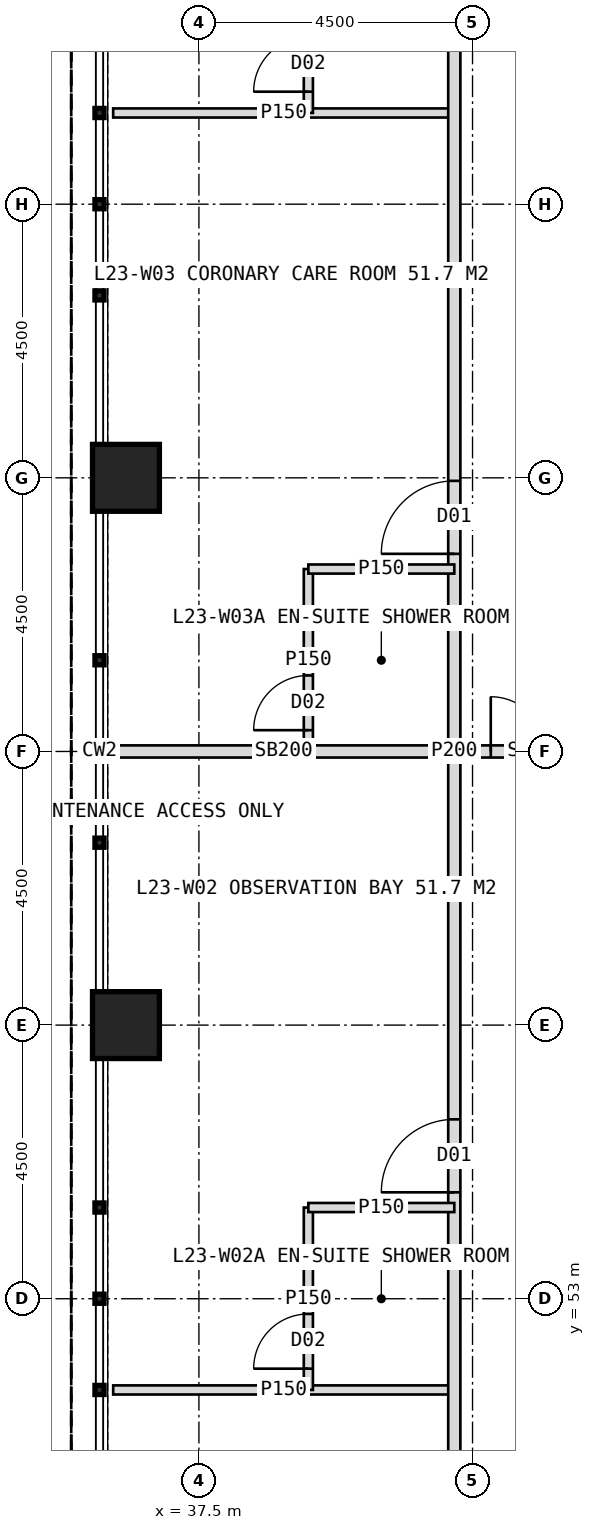
"""IFC4 building model, lengths in metres.
Left out: names, types, materials, properties, quantities, classifications, styles, units other than length and angle.
Written with IfcOpenShell. Run it as: python <this file> out.ifc"""

import sys

from ifc_helpers import new_model, si_unit, direction, frame, frame_2d, origin, origin_2d, place, context, subcontext, project, spatial, rectangle, hollow_rectangle, extrude, element, fill, save


model = new_model("IFC4")
c1 = context("Model", 3, precision=1e-05, world=origin(), true_north=direction((0.0, 1.0)))
c2 = subcontext(c1, "Body", "Model", "MODEL_VIEW")
j1 = project(units=[si_unit("LENGTHUNIT", "METRE"), si_unit("PLANEANGLEUNIT", "RADIAN")], contexts=[c1])
p1 = place(None, origin())
s1 = spatial("IfcSite", under=j1, at=p1, CompositionType="ELEMENT")
p2 = place(p1, origin())
s2 = spatial("IfcBuilding", under=s1, at=p2, CompositionType="ELEMENT")
p3 = place(p2, frame((0.0, 0.0, 100.0)))
s3 = spatial("IfcBuildingStorey", under=s2, at=p3, CompositionType="ELEMENT", Elevation=100.0)
for number, where, z_axis, x_axis in (
    (1, (36.3, 57.5, 0.0), (0.0, 0.0, 1.0), (1.0, 0.0, 0.0)),
    (2, (36.3, 66.5, 0.0), (0.0, 0.0, 1.0), (1.0, 0.0, 0.0)),
):
    element("IfcColumn", number, at=place(p3, frame(where, z_axis=z_axis, x_axis=x_axis)), inside=s3, PredefinedType="COLUMN", context=c2, shape_type="SweptSolid", body=[
        extrude(hollow_rectangle(XDim=1.1, YDim=1.1, WallThickness=0.1, at=origin_2d()), origin(), (0.0, 0.0, 1.0), 4.0),
    ])
p4 = place(p3, frame((41.7, 51.5, 0.0), z_axis=(0.0, 0.0, 1.0), x_axis=(-1.0, 0.0, 0.0)))
e3 = element("IfcWall", 3, at=p4, inside=s3, PredefinedType="PARTITIONING", context=c2, shape_type="SweptSolid", body=[
    extrude(rectangle(XDim=5.61, YDim=0.15, at=frame_2d((2.805, 0.0))), origin(), (0.0, 0.0, 1.0), 3.75),
])
p5 = place(p3, frame((41.7, 62.0, 0.0), z_axis=(0.0, 0.0, 1.0), x_axis=(-1.0, 0.0, 0.0)))
e4 = element("IfcWall", 4, at=p5, inside=s3, PredefinedType="SOLIDWALL", context=c2, shape_type="SweptSolid", body=[
    extrude(rectangle(XDim=5.61, YDim=0.2, at=frame_2d((2.805, 0.0))), origin(), (0.0, 0.0, 1.0), 2.95),
])
p6 = place(p3, frame((41.7, 72.5, 0.0), z_axis=(0.0, 0.0, 1.0), x_axis=(-1.0, 0.0, 0.0)))
e5 = element("IfcWall", 5, at=p6, inside=s3, PredefinedType="PARTITIONING", context=c2, shape_type="SweptSolid", body=[
    extrude(rectangle(XDim=5.61, YDim=0.15, at=frame_2d((2.805, 0.0))), origin(), (0.0, 0.0, 1.0), 3.75),
])
p7 = place(p3, frame((41.7, 43.7, 0.0), z_axis=(0.0, 0.0, 1.0), x_axis=(0.0, 1.0, 0.0)))
e6 = element("IfcWall", 6, at=p7, inside=s3, PredefinedType="PARTITIONING", context=c2, shape_type="SweptSolid", body=[
    extrude(rectangle(XDim=36.6, YDim=0.2, at=frame_2d((18.3, 0.0))), origin(), (0.0, 0.0, 1.0), 3.75),
])
p8 = place(p7, frame((3.25, 0.0, 0.0)))
e7 = element("IfcOpeningElement", 7, at=p8, cuts=e6, PredefinedType="OPENING", context=c2, shape_type="SweptSolid", body=[
    extrude(rectangle(XDim=1.2, YDim=2.2, at=frame_2d((0.6, 1.1))), frame((0.0, 0.11, 0.0), z_axis=(0.0, -1.0, 0.0), x_axis=(1.0, 0.0, 0.0)), (0.0, 0.0, 1.0), 0.22),
])
p9 = place(p7, frame((11.05, 0.0, 0.0)))
e8 = element("IfcOpeningElement", 8, at=p9, cuts=e6, PredefinedType="OPENING", context=c2, shape_type="SweptSolid", body=[
    extrude(rectangle(XDim=1.2, YDim=2.2, at=frame_2d((0.6, 1.1))), frame((0.0, 0.11, 0.0), z_axis=(0.0, -1.0, 0.0), x_axis=(1.0, 0.0, 0.0)), (0.0, 0.0, 1.0), 0.22),
])
p10 = place(p7, frame((21.55, 0.0, 0.0)))
e9 = element("IfcOpeningElement", 9, at=p10, cuts=e6, PredefinedType="OPENING", context=c2, shape_type="SweptSolid", body=[
    extrude(rectangle(XDim=1.2, YDim=2.2, at=frame_2d((0.6, 1.1))), frame((0.0, 0.11, 0.0), z_axis=(0.0, -1.0, 0.0), x_axis=(1.0, 0.0, 0.0)), (0.0, 0.0, 1.0), 0.22),
])
p11 = place(p7, frame((32.05, 0.0, 0.0)))
e10 = element("IfcOpeningElement", 10, at=p11, cuts=e6, PredefinedType="OPENING", context=c2, shape_type="SweptSolid", body=[
    extrude(rectangle(XDim=1.2, YDim=2.2, at=frame_2d((0.6, 1.1))), frame((0.0, 0.11, 0.0), z_axis=(0.0, -1.0, 0.0), x_axis=(1.0, 0.0, 0.0)), (0.0, 0.0, 1.0), 0.22),
])
p12 = place(p3, frame((39.3, 51.5, 0.0), z_axis=(0.0, 0.0, 1.0), x_axis=(0.0, 1.0, 0.0)))
e11 = element("IfcWall", 11, at=p12, inside=s3, PredefinedType="PARTITIONING", context=c2, shape_type="SweptSolid", body=[
    extrude(rectangle(XDim=3.0, YDim=0.15, at=frame_2d((1.5, 0.0))), origin(), (0.0, 0.0, 1.0), 3.75),
])
p13 = place(p12, frame((0.35, 0.0, 0.0)))
e12 = element("IfcOpeningElement", 12, at=p13, cuts=e11, PredefinedType="OPENING", context=c2, shape_type="SweptSolid", body=[
    extrude(rectangle(XDim=0.9, YDim=2.1, at=frame_2d((0.45, 1.05))), frame((0.0, 0.085, 0.0), z_axis=(0.0, -1.0, 0.0), x_axis=(1.0, 0.0, 0.0)), (0.0, 0.0, 1.0), 0.17),
])
p14 = place(p3, frame((41.7, 54.5, 0.0), z_axis=(0.0, 0.0, 1.0), x_axis=(-1.0, 0.0, 0.0)))
e13 = element("IfcWall", 13, at=p14, inside=s3, PredefinedType="PARTITIONING", context=c2, shape_type="SweptSolid", body=[
    extrude(rectangle(XDim=2.4, YDim=0.15, at=frame_2d((1.2, 0.0))), origin(), (0.0, 0.0, 1.0), 3.75),
])
p15 = place(p3, frame((39.3, 62.0, 0.0), z_axis=(0.0, 0.0, 1.0), x_axis=(0.0, 1.0, 0.0)))
e14 = element("IfcWall", 14, at=p15, inside=s3, PredefinedType="PARTITIONING", context=c2, shape_type="SweptSolid", body=[
    extrude(rectangle(XDim=3.0, YDim=0.15, at=frame_2d((1.5, 0.0))), origin(), (0.0, 0.0, 1.0), 3.75),
])
p16 = place(p15, frame((0.35, 0.0, 0.0)))
e15 = element("IfcOpeningElement", 15, at=p16, cuts=e14, PredefinedType="OPENING", context=c2, shape_type="SweptSolid", body=[
    extrude(rectangle(XDim=0.9, YDim=2.1, at=frame_2d((0.45, 1.05))), frame((0.0, 0.085, 0.0), z_axis=(0.0, -1.0, 0.0), x_axis=(1.0, 0.0, 0.0)), (0.0, 0.0, 1.0), 0.17),
])
p17 = place(p3, frame((41.7, 65.0, 0.0), z_axis=(0.0, 0.0, 1.0), x_axis=(-1.0, 0.0, 0.0)))
e16 = element("IfcWall", 16, at=p17, inside=s3, PredefinedType="PARTITIONING", context=c2, shape_type="SweptSolid", body=[
    extrude(rectangle(XDim=2.4, YDim=0.15, at=frame_2d((1.2, 0.0))), origin(), (0.0, 0.0, 1.0), 3.75),
])
p18 = place(p3, frame((39.3, 72.5, 0.0), z_axis=(0.0, 0.0, 1.0), x_axis=(0.0, 1.0, 0.0)))
e17 = element("IfcWall", 17, at=p18, inside=s3, PredefinedType="PARTITIONING", context=c2, shape_type="SweptSolid", body=[
    extrude(rectangle(XDim=3.0, YDim=0.15, at=frame_2d((1.5, 0.0))), origin(), (0.0, 0.0, 1.0), 3.75),
])
p19 = place(p18, frame((0.35, 0.0, 0.0)))
e18 = element("IfcOpeningElement", 18, at=p19, cuts=e17, PredefinedType="OPENING", context=c2, shape_type="SweptSolid", body=[
    extrude(rectangle(XDim=0.9, YDim=2.1, at=frame_2d((0.45, 1.05))), frame((0.0, 0.085, 0.0), z_axis=(0.0, -1.0, 0.0), x_axis=(1.0, 0.0, 0.0)), (0.0, 0.0, 1.0), 0.17),
])
p20 = place(p3, frame((44.4, 62.0, 0.0), z_axis=(0.0, 0.0, 1.0), x_axis=(-1.0, 0.0, 0.0)))
e19 = element("IfcWall", 19, at=p20, inside=s3, PredefinedType="SOLIDWALL", context=c2, shape_type="SweptSolid", body=[
    extrude(rectangle(XDim=2.7, YDim=0.2, at=frame_2d((1.35, 0.0))), origin(), (0.0, 0.0, 1.0), 2.95),
])
p21 = place(p20, frame((0.3, 0.0, 0.0)))
e20 = element("IfcOpeningElement", 20, at=p21, cuts=e19, PredefinedType="OPENING", context=c2, shape_type="SweptSolid", body=[
    extrude(rectangle(XDim=1.8, YDim=2.2, at=frame_2d((0.9, 1.1))), frame((0.0, 0.11, 0.0), z_axis=(0.0, -1.0, 0.0), x_axis=(1.0, 0.0, 0.0)), (0.0, 0.0, 1.0), 0.22),
])
p22 = place(p9, origin())
e21 = element("IfcDoor", 21, at=p22, inside=s3, OperationType="SINGLE_SWING_LEFT", PredefinedType="DOOR", context=c2, shape_type="SweptSolid", body=[
    extrude(rectangle(XDim=1.2, YDim=2.2, at=frame_2d((0.6, 1.1))), frame((0.0, 0.025, 0.0), z_axis=(0.0, -1.0, 0.0), x_axis=(1.0, 0.0, 0.0)), (0.0, 0.0, 1.0), 0.05),
])
fill(e8, e21)
p23 = place(p13, origin())
e22 = element("IfcDoor", 22, at=p23, inside=s3, OperationType="SINGLE_SWING_LEFT", PredefinedType="DOOR", context=c2, shape_type="SweptSolid", body=[
    extrude(rectangle(XDim=0.9, YDim=2.1, at=frame_2d((0.45, 1.05))), frame((0.0, 0.025, 0.0), z_axis=(0.0, -1.0, 0.0), x_axis=(1.0, 0.0, 0.0)), (0.0, 0.0, 1.0), 0.05),
])
fill(e12, e22)
p24 = place(p10, origin())
e23 = element("IfcDoor", 23, at=p24, inside=s3, OperationType="SINGLE_SWING_LEFT", PredefinedType="DOOR", context=c2, shape_type="SweptSolid", body=[
    extrude(rectangle(XDim=1.2, YDim=2.2, at=frame_2d((0.6, 1.1))), frame((0.0, 0.025, 0.0), z_axis=(0.0, -1.0, 0.0), x_axis=(1.0, 0.0, 0.0)), (0.0, 0.0, 1.0), 0.05),
])
fill(e9, e23)
p25 = place(p16, origin())
e24 = element("IfcDoor", 24, at=p25, inside=s3, OperationType="SINGLE_SWING_LEFT", PredefinedType="DOOR", context=c2, shape_type="SweptSolid", body=[
    extrude(rectangle(XDim=0.9, YDim=2.1, at=frame_2d((0.45, 1.05))), frame((0.0, 0.025, 0.0), z_axis=(0.0, -1.0, 0.0), x_axis=(1.0, 0.0, 0.0)), (0.0, 0.0, 1.0), 0.05),
])
fill(e15, e24)
p26 = place(p19, origin())
e25 = element("IfcDoor", 25, at=p26, inside=s3, OperationType="SINGLE_SWING_LEFT", PredefinedType="DOOR", context=c2, shape_type="SweptSolid", body=[
    extrude(rectangle(XDim=0.9, YDim=2.1, at=frame_2d((0.45, 1.05))), frame((0.0, 0.025, 0.0), z_axis=(0.0, -1.0, 0.0), x_axis=(1.0, 0.0, 0.0)), (0.0, 0.0, 1.0), 0.05),
])
fill(e18, e25)
p27 = place(p21, origin())
e26 = element("IfcDoor", 26, at=p27, inside=s3, OperationType="DOUBLE_DOOR_DOUBLE_SWING", PredefinedType="DOOR", context=c2, shape_type="SweptSolid", body=[
    extrude(rectangle(XDim=1.8, YDim=2.2, at=frame_2d((0.9, 1.1))), frame((0.0, 0.025, 0.0), z_axis=(0.0, -1.0, 0.0), x_axis=(1.0, 0.0, 0.0)), (0.0, 0.0, 1.0), 0.05),
])
fill(e20, e26)
save(model, sys.argv[1])
